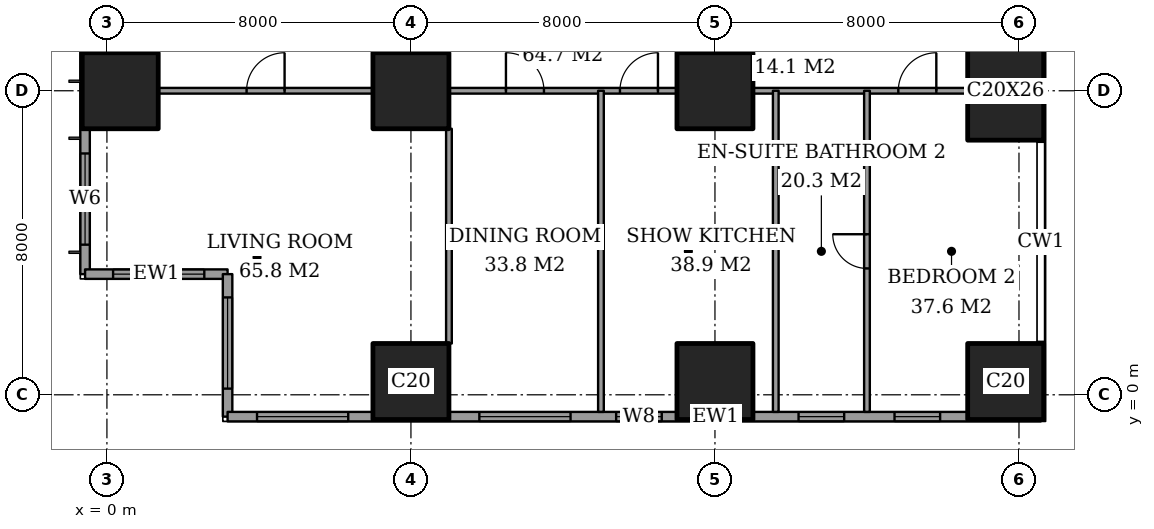
"""IFC4 building model, lengths in metres.
Left out: names, types, materials, properties, quantities, classifications, styles, units other than length and angle.
Written with IfcOpenShell. Run it as: python <this file> out.ifc"""

import sys

from ifc_helpers import new_model, si_unit, direction, frame, frame_2d, origin, origin_2d, place, context, subcontext, project, spatial, rectangle, extrude, element, fill, save


model = new_model("IFC4")
c1 = context("Model", 3, precision=1e-05, world=origin(), true_north=direction((0.0, 1.0)))
c2 = subcontext(c1, "Body", "Model", "MODEL_VIEW")
j1 = project(units=[si_unit("LENGTHUNIT", "METRE"), si_unit("PLANEANGLEUNIT", "RADIAN")], contexts=[c1])
p1 = place(None, origin())
s1 = spatial("IfcSite", under=j1, at=p1, CompositionType="ELEMENT")
p2 = place(p1, origin())
s2 = spatial("IfcBuilding", under=s1, at=p2, CompositionType="ELEMENT")
p3 = place(p2, frame((0.0, 0.0, 36.8)))
s3 = spatial("IfcBuildingStorey", under=s2, at=p3, CompositionType="ELEMENT", Elevation=36.8)
for number, where, z_axis, x_axis in (
    (1, (0.35, 8.0, 0.0), (0.0, 0.0, 1.0), (1.0, 0.0, 0.0)),
    (2, (8.0, 0.35, 0.0), (0.0, 0.0, 1.0), (1.0, 0.0, 0.0)),
    (3, (8.0, 8.0, 0.0), (0.0, 0.0, 1.0), (1.0, 0.0, 0.0)),
    (4, (16.0, 0.35, 0.0), (0.0, 0.0, 1.0), (1.0, 0.0, 0.0)),
    (5, (16.0, 8.0, 0.0), (0.0, 0.0, 1.0), (1.0, 0.0, 0.0)),
    (6, (23.65, 0.35, 0.0), (0.0, 0.0, 1.0), (1.0, 0.0, 0.0)),
):
    element("IfcColumn", number, at=place(p3, frame(where, z_axis=z_axis, x_axis=x_axis)), inside=s3, PredefinedType="COLUMN", context=c2, shape_type="SweptSolid", body=[
        extrude(rectangle(XDim=2.0, YDim=2.0, at=origin_2d()), origin(), (0.0, 0.0, 1.0), 3.6),
    ])
p4 = place(p3, frame((23.65, 8.0, 0.0), z_axis=(0.0, 0.0, 1.0), x_axis=(1.0, 0.0, 0.0)))
e7 = element("IfcColumn", 7, at=p4, inside=s3, PredefinedType="COLUMN", context=c2, shape_type="SweptSolid", body=[
    extrude(rectangle(XDim=2.0, YDim=2.6, at=origin_2d()), origin(), (0.0, 0.0, 1.0), 3.6),
])
p5 = place(p3, frame((-0.575, 44.825, 0.0), z_axis=(0.0, 0.0, 1.0), x_axis=(0.0, -1.0, 0.0)))
e8 = element("IfcWall", 8, at=p5, inside=s3, PredefinedType="SOLIDWALL", context=c2, shape_type="SweptSolid", body=[
    extrude(rectangle(XDim=41.65, YDim=0.25, at=frame_2d((20.825, 0.0))), origin(), (0.0, 0.0, 1.0), 3.6),
])
p6 = place(p5, frame((0.775, 0.0, 0.6)))
e9 = element("IfcOpeningElement", 9, at=p6, cuts=e8, PredefinedType="OPENING", context=c2, shape_type="SweptSolid", body=[
    extrude(rectangle(XDim=2.4, YDim=2.0, at=frame_2d((1.2, 1.0))), frame((0.0, 0.135, 0.0), z_axis=(0.0, -1.0, 0.0), x_axis=(1.0, 0.0, 0.0)), (0.0, 0.0, 1.0), 0.27),
])
p7 = place(p5, frame((6.1, 0.0, 0.6)))
e10 = element("IfcOpeningElement", 10, at=p7, cuts=e8, PredefinedType="OPENING", context=c2, shape_type="SweptSolid", body=[
    extrude(rectangle(XDim=1.2, YDim=2.0, at=frame_2d((0.6, 1.0))), frame((0.0, 0.135, 0.0), z_axis=(0.0, -1.0, 0.0), x_axis=(1.0, 0.0, 0.0)), (0.0, 0.0, 1.0), 0.27),
])
p8 = place(p5, frame((8.425, 0.0, 0.6)))
e11 = element("IfcOpeningElement", 11, at=p8, cuts=e8, PredefinedType="OPENING", context=c2, shape_type="SweptSolid", body=[
    extrude(rectangle(XDim=2.4, YDim=2.0, at=frame_2d((1.2, 1.0))), frame((0.0, 0.135, 0.0), z_axis=(0.0, -1.0, 0.0), x_axis=(1.0, 0.0, 0.0)), (0.0, 0.0, 1.0), 0.27),
])
p9 = place(p5, frame((15.625, 0.0, 0.6)))
e12 = element("IfcOpeningElement", 12, at=p9, cuts=e8, PredefinedType="OPENING", context=c2, shape_type="SweptSolid", body=[
    extrude(rectangle(XDim=2.4, YDim=2.0, at=frame_2d((1.2, 1.0))), frame((0.0, 0.135, 0.0), z_axis=(0.0, -1.0, 0.0), x_axis=(1.0, 0.0, 0.0)), (0.0, 0.0, 1.0), 0.27),
])
p10 = place(p5, frame((23.625, 0.0, 0.6)))
e13 = element("IfcOpeningElement", 13, at=p10, cuts=e8, PredefinedType="OPENING", context=c2, shape_type="SweptSolid", body=[
    extrude(rectangle(XDim=2.4, YDim=2.0, at=frame_2d((1.2, 1.0))), frame((0.0, 0.135, 0.0), z_axis=(0.0, -1.0, 0.0), x_axis=(1.0, 0.0, 0.0)), (0.0, 0.0, 1.0), 0.27),
])
p11 = place(p5, frame((30.825, 0.0, 0.6)))
e14 = element("IfcOpeningElement", 14, at=p11, cuts=e8, PredefinedType="OPENING", context=c2, shape_type="SweptSolid", body=[
    extrude(rectangle(XDim=2.4, YDim=2.0, at=frame_2d((1.2, 1.0))), frame((0.0, 0.135, 0.0), z_axis=(0.0, -1.0, 0.0), x_axis=(1.0, 0.0, 0.0)), (0.0, 0.0, 1.0), 0.27),
])
p12 = place(p5, frame((34.5, 0.0, 0.6)))
e15 = element("IfcOpeningElement", 15, at=p12, cuts=e8, PredefinedType="OPENING", context=c2, shape_type="SweptSolid", body=[
    extrude(rectangle(XDim=1.2, YDim=2.0, at=frame_2d((0.6, 1.0))), frame((0.0, 0.135, 0.0), z_axis=(0.0, -1.0, 0.0), x_axis=(1.0, 0.0, 0.0)), (0.0, 0.0, 1.0), 0.27),
])
p13 = place(p5, frame((38.475, 0.0, 0.6)))
e16 = element("IfcOpeningElement", 16, at=p13, cuts=e8, PredefinedType="OPENING", context=c2, shape_type="SweptSolid", body=[
    extrude(rectangle(XDim=2.4, YDim=2.0, at=frame_2d((1.2, 1.0))), frame((0.0, 0.135, 0.0), z_axis=(0.0, -1.0, 0.0), x_axis=(1.0, 0.0, 0.0)), (0.0, 0.0, 1.0), 0.27),
])
p14 = place(p3, frame((-0.575, 3.175, 0.0), z_axis=(0.0, 0.0, 1.0), x_axis=(1.0, 0.0, 0.0)))
e17 = element("IfcWall", 17, at=p14, inside=s3, PredefinedType="SOLIDWALL", context=c2, shape_type="SweptSolid", body=[
    extrude(rectangle(XDim=3.75, YDim=0.25, at=frame_2d((1.875, 0.0))), origin(), (0.0, 0.0, 1.0), 3.6),
])
p15 = place(p14, frame((0.738, 0.0, 0.6)))
e18 = element("IfcOpeningElement", 18, at=p15, cuts=e17, PredefinedType="OPENING", context=c2, shape_type="SweptSolid", body=[
    extrude(rectangle(XDim=2.4, YDim=2.0, at=frame_2d((1.2, 1.0))), frame((0.0, 0.135, 0.0), z_axis=(0.0, -1.0, 0.0), x_axis=(1.0, 0.0, 0.0)), (0.0, 0.0, 1.0), 0.27),
])
p16 = place(p3, frame((3.175, 3.175, 0.0), z_axis=(0.0, 0.0, 1.0), x_axis=(0.0, -1.0, 0.0)))
e19 = element("IfcWall", 19, at=p16, inside=s3, PredefinedType="SOLIDWALL", context=c2, shape_type="SweptSolid", body=[
    extrude(rectangle(XDim=3.75, YDim=0.25, at=frame_2d((1.875, 0.0))), origin(), (0.0, 0.0, 1.0), 3.6),
])
p17 = place(p16, frame((0.613, 0.0, 0.6)))
e20 = element("IfcOpeningElement", 20, at=p17, cuts=e19, PredefinedType="OPENING", context=c2, shape_type="SweptSolid", body=[
    extrude(rectangle(XDim=2.4, YDim=2.0, at=frame_2d((1.2, 1.0))), frame((0.0, 0.135, 0.0), z_axis=(0.0, -1.0, 0.0), x_axis=(1.0, 0.0, 0.0)), (0.0, 0.0, 1.0), 0.27),
])
p18 = place(p3, frame((3.175, -0.575, 0.0), z_axis=(0.0, 0.0, 1.0), x_axis=(1.0, 0.0, 0.0)))
e21 = element("IfcWall", 21, at=p18, inside=s3, PredefinedType="SOLIDWALL", context=c2, shape_type="SweptSolid", body=[
    extrude(rectangle(XDim=21.4, YDim=0.25, at=frame_2d((10.7, 0.0))), origin(), (0.0, 0.0, 1.0), 3.6),
])
p19 = place(p18, frame((0.775, 0.0, 0.6)))
e22 = element("IfcOpeningElement", 22, at=p19, cuts=e21, PredefinedType="OPENING", context=c2, shape_type="SweptSolid", body=[
    extrude(rectangle(XDim=2.4, YDim=2.0, at=frame_2d((1.2, 1.0))), frame((0.0, 0.135, 0.0), z_axis=(0.0, -1.0, 0.0), x_axis=(1.0, 0.0, 0.0)), (0.0, 0.0, 1.0), 0.27),
])
p20 = place(p18, frame((6.625, 0.0, 0.6)))
e23 = element("IfcOpeningElement", 23, at=p20, cuts=e21, PredefinedType="OPENING", context=c2, shape_type="SweptSolid", body=[
    extrude(rectangle(XDim=2.4, YDim=2.0, at=frame_2d((1.2, 1.0))), frame((0.0, 0.135, 0.0), z_axis=(0.0, -1.0, 0.0), x_axis=(1.0, 0.0, 0.0)), (0.0, 0.0, 1.0), 0.27),
])
p21 = place(p18, frame((10.225, 0.0, 0.6)))
e24 = element("IfcOpeningElement", 24, at=p21, cuts=e21, PredefinedType="OPENING", context=c2, shape_type="SweptSolid", body=[
    extrude(rectangle(XDim=1.2, YDim=2.0, at=frame_2d((0.6, 1.0))), frame((0.0, 0.135, 0.0), z_axis=(0.0, -1.0, 0.0), x_axis=(1.0, 0.0, 0.0)), (0.0, 0.0, 1.0), 0.27),
])
p22 = place(p18, frame((15.025, 0.0, 0.6)))
e25 = element("IfcOpeningElement", 25, at=p22, cuts=e21, PredefinedType="OPENING", context=c2, shape_type="SweptSolid", body=[
    extrude(rectangle(XDim=1.2, YDim=2.0, at=frame_2d((0.6, 1.0))), frame((0.0, 0.135, 0.0), z_axis=(0.0, -1.0, 0.0), x_axis=(1.0, 0.0, 0.0)), (0.0, 0.0, 1.0), 0.27),
])
p23 = place(p18, frame((17.55, 0.0, 0.6)))
e26 = element("IfcOpeningElement", 26, at=p23, cuts=e21, PredefinedType="OPENING", context=c2, shape_type="SweptSolid", body=[
    extrude(rectangle(XDim=1.2, YDim=2.0, at=frame_2d((0.6, 1.0))), frame((0.0, 0.135, 0.0), z_axis=(0.0, -1.0, 0.0), x_axis=(1.0, 0.0, 0.0)), (0.0, 0.0, 1.0), 0.27),
])
p24 = place(p3, frame((1.35, 8.0, 0.0), z_axis=(0.0, 0.0, 1.0), x_axis=(1.0, 0.0, 0.0)))
e27 = element("IfcWall", 27, at=p24, inside=s3, PredefinedType="PARTITIONING", context=c2, shape_type="SweptSolid", body=[
    extrude(rectangle(XDim=5.65, YDim=0.15, at=frame_2d((2.825, 0.0))), origin(), (0.0, 0.0, 1.0), 3.35),
])
p25 = place(p24, frame((2.325, 0.0, 0.0)))
e28 = element("IfcOpeningElement", 28, at=p25, cuts=e27, PredefinedType="OPENING", context=c2, shape_type="SweptSolid", body=[
    extrude(rectangle(XDim=1.0, YDim=2.1, at=frame_2d((0.5, 1.05))), frame((0.0, 0.085, 0.0), z_axis=(0.0, -1.0, 0.0), x_axis=(1.0, 0.0, 0.0)), (0.0, 0.0, 1.0), 0.17),
])
p26 = place(p3, frame((9.0, 8.0, 0.0), z_axis=(0.0, 0.0, 1.0), x_axis=(1.0, 0.0, 0.0)))
e29 = element("IfcWall", 29, at=p26, inside=s3, PredefinedType="PARTITIONING", context=c2, shape_type="SweptSolid", body=[
    extrude(rectangle(XDim=6.0, YDim=0.15, at=frame_2d((3.0, 0.0))), origin(), (0.0, 0.0, 1.0), 3.35),
])
p27 = place(p26, frame((1.5, 0.0, 0.0)))
e30 = element("IfcOpeningElement", 30, at=p27, cuts=e29, PredefinedType="OPENING", context=c2, shape_type="SweptSolid", body=[
    extrude(rectangle(XDim=1.0, YDim=2.1, at=frame_2d((0.5, 1.05))), frame((0.0, 0.085, 0.0), z_axis=(0.0, -1.0, 0.0), x_axis=(1.0, 0.0, 0.0)), (0.0, 0.0, 1.0), 0.17),
])
p28 = place(p26, frame((4.5, 0.0, 0.0)))
e31 = element("IfcOpeningElement", 31, at=p28, cuts=e29, PredefinedType="OPENING", context=c2, shape_type="SweptSolid", body=[
    extrude(rectangle(XDim=1.0, YDim=2.1, at=frame_2d((0.5, 1.05))), frame((0.0, 0.085, 0.0), z_axis=(0.0, -1.0, 0.0), x_axis=(1.0, 0.0, 0.0)), (0.0, 0.0, 1.0), 0.17),
])
p29 = place(p3, frame((17.0, 8.0, 0.0), z_axis=(0.0, 0.0, 1.0), x_axis=(1.0, 0.0, 0.0)))
e32 = element("IfcWall", 32, at=p29, inside=s3, PredefinedType="PARTITIONING", context=c2, shape_type="SweptSolid", body=[
    extrude(rectangle(XDim=5.65, YDim=0.15, at=frame_2d((2.825, 0.0))), origin(), (0.0, 0.0, 1.0), 3.35),
])
p30 = place(p29, frame((3.825, 0.0, 0.0)))
e33 = element("IfcOpeningElement", 33, at=p30, cuts=e32, PredefinedType="OPENING", context=c2, shape_type="SweptSolid", body=[
    extrude(rectangle(XDim=1.0, YDim=2.1, at=frame_2d((0.5, 1.05))), frame((0.0, 0.085, 0.0), z_axis=(0.0, -1.0, 0.0), x_axis=(1.0, 0.0, 0.0)), (0.0, 0.0, 1.0), 0.17),
])
p31 = place(p3, frame((9.0, 1.35, 0.0), z_axis=(0.0, 0.0, 1.0), x_axis=(0.0, 1.0, 0.0)))
e34 = element("IfcWall", 34, at=p31, inside=s3, PredefinedType="PARTITIONING", context=c2, shape_type="SweptSolid", body=[
    extrude(rectangle(XDim=5.65, YDim=0.15, at=frame_2d((2.825, 0.0))), origin(), (0.0, 0.0, 1.0), 3.35),
])
for number, where, z_axis, x_axis in (
    (35, (13.0, -0.45, 0.0), (0.0, 0.0, 1.0), (0.0, 1.0, 0.0)),
    (36, (17.6, -0.45, 0.0), (0.0, 0.0, 1.0), (0.0, 1.0, 0.0)),
):
    element("IfcWall", number, at=place(p3, frame(where, z_axis=z_axis, x_axis=x_axis)), inside=s3, PredefinedType="PARTITIONING", context=c2, shape_type="SweptSolid", body=[
        extrude(rectangle(XDim=8.45, YDim=0.15, at=frame_2d((4.225, 0.0))), origin(), (0.0, 0.0, 1.0), 3.35),
    ])
p32 = place(p3, frame((20.0, -0.45, 0.0), z_axis=(0.0, 0.0, 1.0), x_axis=(0.0, 1.0, 0.0)))
e37 = element("IfcWall", 37, at=p32, inside=s3, PredefinedType="PARTITIONING", context=c2, shape_type="SweptSolid", body=[
    extrude(rectangle(XDim=8.45, YDim=0.15, at=frame_2d((4.225, 0.0))), origin(), (0.0, 0.0, 1.0), 3.35),
])
p33 = place(p32, frame((3.775, 0.0, 0.0)))
e38 = element("IfcOpeningElement", 38, at=p33, cuts=e37, PredefinedType="OPENING", context=c2, shape_type="SweptSolid", body=[
    extrude(rectangle(XDim=0.9, YDim=2.1, at=frame_2d((0.45, 1.05))), frame((0.0, 0.085, 0.0), z_axis=(0.0, -1.0, 0.0), x_axis=(1.0, 0.0, 0.0)), (0.0, 0.0, 1.0), 0.17),
])
p34 = place(p13, origin())
e39 = element("IfcWindow", 39, at=p34, inside=s3, PartitioningType="SINGLE_PANEL", PredefinedType="WINDOW", context=c2, shape_type="SweptSolid", body=[
    extrude(rectangle(XDim=2.4, YDim=2.0, at=frame_2d((1.2, 1.0))), frame((0.0, 0.03, 0.0), z_axis=(0.0, -1.0, 0.0), x_axis=(1.0, 0.0, 0.0)), (0.0, 0.0, 1.0), 0.06),
])
fill(e16, e39)
p35 = place(p15, origin())
e40 = element("IfcWindow", 40, at=p35, inside=s3, PartitioningType="SINGLE_PANEL", PredefinedType="WINDOW", context=c2, shape_type="SweptSolid", body=[
    extrude(rectangle(XDim=2.4, YDim=2.0, at=frame_2d((1.2, 1.0))), frame((0.0, 0.03, 0.0), z_axis=(0.0, -1.0, 0.0), x_axis=(1.0, 0.0, 0.0)), (0.0, 0.0, 1.0), 0.06),
])
fill(e18, e40)
p36 = place(p17, origin())
e41 = element("IfcWindow", 41, at=p36, inside=s3, PartitioningType="SINGLE_PANEL", PredefinedType="WINDOW", context=c2, shape_type="SweptSolid", body=[
    extrude(rectangle(XDim=2.4, YDim=2.0, at=frame_2d((1.2, 1.0))), frame((0.0, 0.03, 0.0), z_axis=(0.0, -1.0, 0.0), x_axis=(1.0, 0.0, 0.0)), (0.0, 0.0, 1.0), 0.06),
])
fill(e20, e41)
p37 = place(p19, origin())
e42 = element("IfcWindow", 42, at=p37, inside=s3, PartitioningType="SINGLE_PANEL", PredefinedType="WINDOW", context=c2, shape_type="SweptSolid", body=[
    extrude(rectangle(XDim=2.4, YDim=2.0, at=frame_2d((1.2, 1.0))), frame((0.0, 0.03, 0.0), z_axis=(0.0, -1.0, 0.0), x_axis=(1.0, 0.0, 0.0)), (0.0, 0.0, 1.0), 0.06),
])
fill(e22, e42)
p38 = place(p20, origin())
e43 = element("IfcWindow", 43, at=p38, inside=s3, PartitioningType="SINGLE_PANEL", PredefinedType="WINDOW", context=c2, shape_type="SweptSolid", body=[
    extrude(rectangle(XDim=2.4, YDim=2.0, at=frame_2d((1.2, 1.0))), frame((0.0, 0.03, 0.0), z_axis=(0.0, -1.0, 0.0), x_axis=(1.0, 0.0, 0.0)), (0.0, 0.0, 1.0), 0.06),
])
fill(e23, e43)
p39 = place(p21, origin())
e44 = element("IfcWindow", 44, at=p39, inside=s3, PartitioningType="SINGLE_PANEL", PredefinedType="WINDOW", context=c2, shape_type="SweptSolid", body=[
    extrude(rectangle(XDim=1.2, YDim=2.0, at=frame_2d((0.6, 1.0))), frame((0.0, 0.03, 0.0), z_axis=(0.0, -1.0, 0.0), x_axis=(1.0, 0.0, 0.0)), (0.0, 0.0, 1.0), 0.06),
])
fill(e24, e44)
p40 = place(p22, origin())
e45 = element("IfcWindow", 45, at=p40, inside=s3, PartitioningType="SINGLE_PANEL", PredefinedType="WINDOW", context=c2, shape_type="SweptSolid", body=[
    extrude(rectangle(XDim=1.2, YDim=2.0, at=frame_2d((0.6, 1.0))), frame((0.0, 0.03, 0.0), z_axis=(0.0, -1.0, 0.0), x_axis=(1.0, 0.0, 0.0)), (0.0, 0.0, 1.0), 0.06),
])
fill(e25, e45)
p41 = place(p23, origin())
e46 = element("IfcWindow", 46, at=p41, inside=s3, PartitioningType="SINGLE_PANEL", PredefinedType="WINDOW", context=c2, shape_type="SweptSolid", body=[
    extrude(rectangle(XDim=1.2, YDim=2.0, at=frame_2d((0.6, 1.0))), frame((0.0, 0.03, 0.0), z_axis=(0.0, -1.0, 0.0), x_axis=(1.0, 0.0, 0.0)), (0.0, 0.0, 1.0), 0.06),
])
fill(e26, e46)
p42 = place(p25, origin())
e47 = element("IfcDoor", 47, at=p42, inside=s3, OperationType="SINGLE_SWING_LEFT", PredefinedType="DOOR", context=c2, shape_type="SweptSolid", body=[
    extrude(rectangle(XDim=1.0, YDim=2.1, at=frame_2d((0.5, 1.05))), frame((0.0, 0.025, 0.0), z_axis=(0.0, -1.0, 0.0), x_axis=(1.0, 0.0, 0.0)), (0.0, 0.0, 1.0), 0.05),
])
fill(e28, e47)
p43 = place(p27, origin())
e48 = element("IfcDoor", 48, at=p43, inside=s3, OperationType="SINGLE_SWING_RIGHT", PredefinedType="DOOR", context=c2, shape_type="SweptSolid", body=[
    extrude(rectangle(XDim=1.0, YDim=2.1, at=frame_2d((0.5, 1.05))), frame((0.0, 0.025, 0.0), z_axis=(0.0, -1.0, 0.0), x_axis=(1.0, 0.0, 0.0)), (0.0, 0.0, 1.0), 0.05),
])
fill(e30, e48)
p44 = place(p28, origin())
e49 = element("IfcDoor", 49, at=p44, inside=s3, OperationType="SINGLE_SWING_LEFT", PredefinedType="DOOR", context=c2, shape_type="SweptSolid", body=[
    extrude(rectangle(XDim=1.0, YDim=2.1, at=frame_2d((0.5, 1.05))), frame((0.0, 0.025, 0.0), z_axis=(0.0, -1.0, 0.0), x_axis=(1.0, 0.0, 0.0)), (0.0, 0.0, 1.0), 0.05),
])
fill(e31, e49)
p45 = place(p33, origin())
e50 = element("IfcDoor", 50, at=p45, inside=s3, OperationType="SINGLE_SWING_LEFT", PredefinedType="DOOR", context=c2, shape_type="SweptSolid", body=[
    extrude(rectangle(XDim=0.9, YDim=2.1, at=frame_2d((0.45, 1.05))), frame((0.0, 0.025, 0.0), z_axis=(0.0, -1.0, 0.0), x_axis=(1.0, 0.0, 0.0)), (0.0, 0.0, 1.0), 0.05),
])
fill(e38, e50)
p46 = place(p30, origin())
e51 = element("IfcDoor", 51, at=p46, inside=s3, OperationType="SINGLE_SWING_LEFT", PredefinedType="DOOR", context=c2, shape_type="SweptSolid", body=[
    extrude(rectangle(XDim=1.0, YDim=2.1, at=frame_2d((0.5, 1.05))), frame((0.0, 0.025, 0.0), z_axis=(0.0, -1.0, 0.0), x_axis=(1.0, 0.0, 0.0)), (0.0, 0.0, 1.0), 0.05),
])
fill(e33, e51)
save(model, sys.argv[1])
